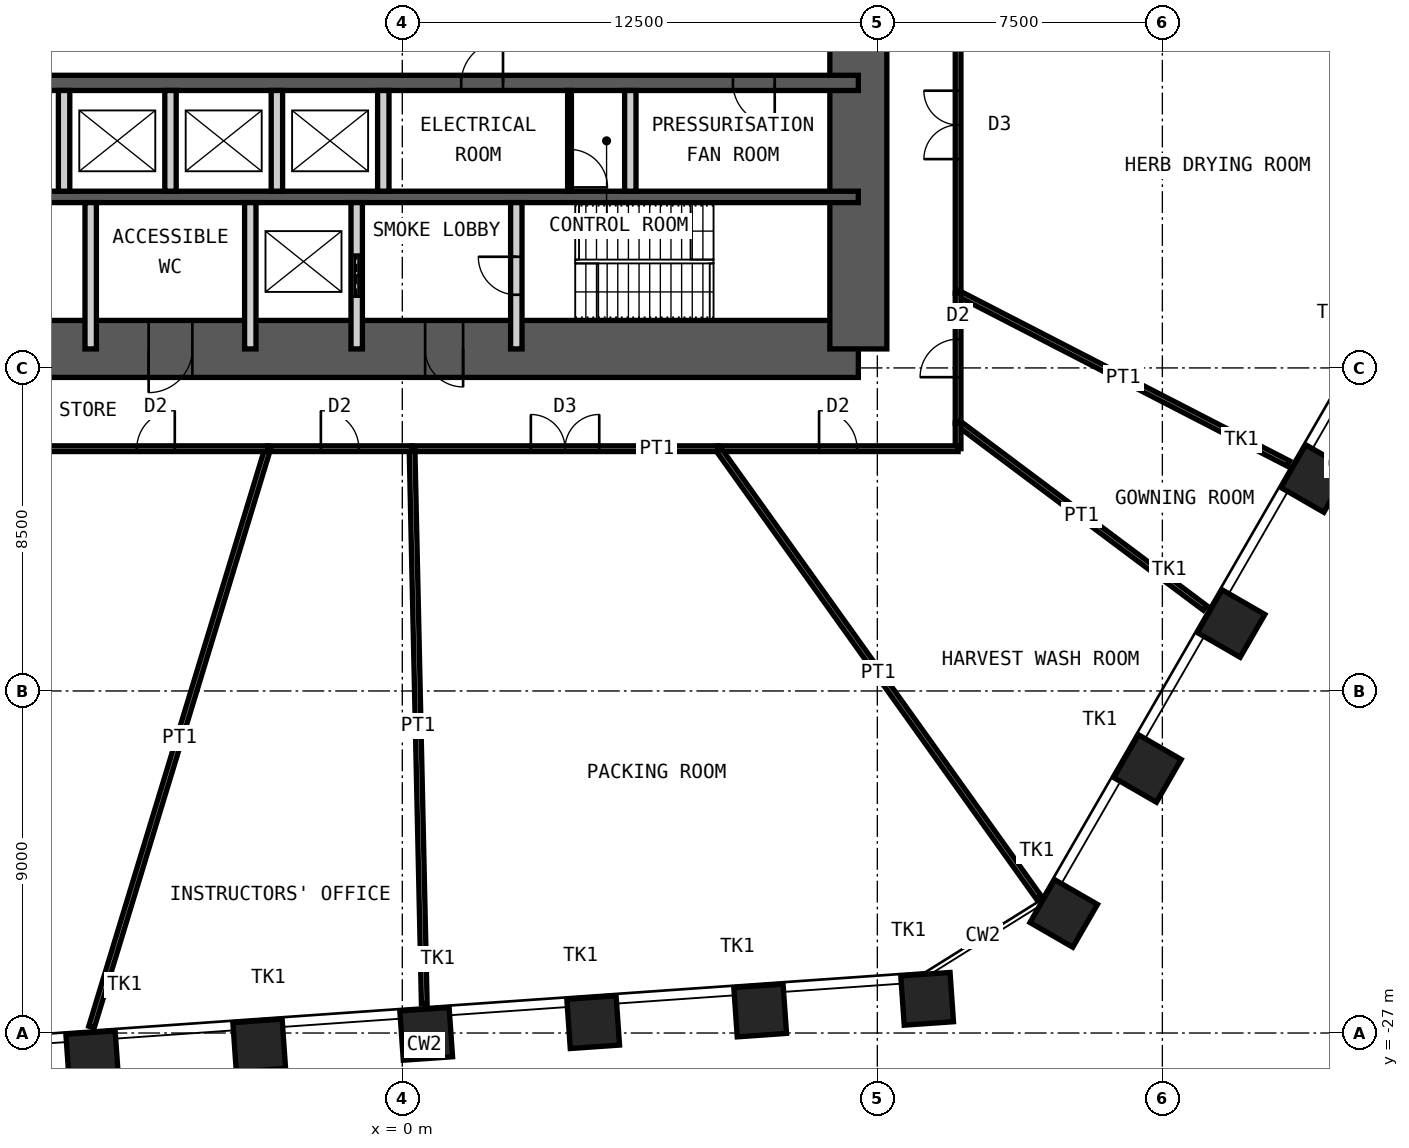
"""IFC4 building model, lengths in metres.
Left out: names, types, materials, properties, quantities, classifications, styles, units other than length and angle.
Written with IfcOpenShell. Run it as: python <this file> out.ifc"""

import sys

from ifc_helpers import new_model, si_unit, direction, frame, frame_2d, origin, origin_2d, place, context, subcontext, project, spatial, rectangle, hollow_rectangle, extrude, element, fill, save


model = new_model("IFC4")
c1 = context("Model", 3, precision=1e-05, world=origin(), true_north=direction((0.0, 1.0)))
c2 = subcontext(c1, "Body", "Model", "MODEL_VIEW")
j1 = project(units=[si_unit("LENGTHUNIT", "METRE"), si_unit("PLANEANGLEUNIT", "RADIAN")], contexts=[c1])
p1 = place(None, origin())
s1 = spatial("IfcSite", under=j1, at=p1, CompositionType="ELEMENT")
p2 = place(p1, origin())
s2 = spatial("IfcBuilding", under=s1, at=p2, CompositionType="ELEMENT")
p3 = place(p2, frame((0.0, 0.0, 92.0)))
s3 = spatial("IfcBuildingStorey", under=s2, at=p3, CompositionType="ELEMENT", Elevation=92.0)
for number, where, z_axis, x_axis in (
    (1, (24.011, -12.411, 0.0), (0.0, 0.0, 1.0), (0.5, 0.866, 0.0)),
    (2, (21.809, -16.225, 0.0), (0.0, 0.0, 1.0), (0.5, 0.866, 0.0)),
    (3, (19.607, -20.04, 0.0), (0.0, 0.0, 1.0), (0.5, 0.866, 0.0)),
    (4, (17.405, -23.854, 0.0), (0.0, 0.0, 1.0), (0.5, 0.866, 0.0)),
    (5, (13.811, -26.1, 0.0), (0.0, 0.0, 1.0), (0.998, 0.07, 0.0)),
    (6, (9.417, -26.407, 0.0), (0.0, 0.0, 1.0), (0.998, 0.07, 0.0)),
    (7, (5.023, -26.715, 0.0), (0.0, 0.0, 1.0), (0.998, 0.07, 0.0)),
    (8, (0.629, -27.022, 0.0), (0.0, 0.0, 1.0), (0.998, 0.07, 0.0)),
    (9, (-3.765, -27.329, 0.0), (0.0, 0.0, 1.0), (0.998, 0.07, 0.0)),
    (10, (-8.159, -27.636, 0.0), (0.0, 0.0, 1.0), (0.998, 0.07, 0.0)),
):
    element("IfcColumn", number, at=place(p3, frame(where, z_axis=z_axis, x_axis=x_axis)), inside=s3, PredefinedType="COLUMN", context=c2, shape_type="SweptSolid", body=[
        extrude(hollow_rectangle(XDim=1.3, YDim=1.3, WallThickness=0.1, at=origin_2d()), origin(), (0.0, 0.0, 1.0), 5.0),
    ])
p4 = place(p3, frame((-12.0, -9.0, 0.0), z_axis=(0.0, 0.0, 1.0), x_axis=(1.0, 0.0, 0.0)))
e11 = element("IfcWall", 11, at=p4, inside=s3, PredefinedType="SHEAR", context=c2, shape_type="SweptSolid", body=[
    extrude(rectangle(XDim=24.0, YDim=1.5, at=frame_2d((12.0, 0.0))), origin(), (0.0, 0.0, 1.0), 5.0),
])
p5 = place(p4, frame((1.35, 0.0, 0.0)))
e12 = element("IfcOpeningElement", 12, at=p5, cuts=e11, PredefinedType="OPENING", context=c2, shape_type="SweptSolid", body=[
    extrude(rectangle(XDim=1.0, YDim=2.1, at=frame_2d((0.5, 1.05))), frame((0.0, 0.76, 0.0), z_axis=(0.0, -1.0, 0.0), x_axis=(1.0, 0.0, 0.0)), (0.0, 0.0, 1.0), 1.52),
])
p6 = place(p4, frame((5.325, 0.0, 0.0)))
e13 = element("IfcOpeningElement", 13, at=p6, cuts=e11, PredefinedType="OPENING", context=c2, shape_type="SweptSolid", body=[
    extrude(rectangle(XDim=1.15, YDim=2.1, at=frame_2d((0.575, 1.05))), frame((0.0, 0.76, 0.0), z_axis=(0.0, -1.0, 0.0), x_axis=(1.0, 0.0, 0.0)), (0.0, 0.0, 1.0), 1.52),
])
p7 = place(p4, frame((12.6, 0.0, 0.0)))
e14 = element("IfcOpeningElement", 14, at=p7, cuts=e11, PredefinedType="OPENING", context=c2, shape_type="SweptSolid", body=[
    extrude(rectangle(XDim=1.0, YDim=2.1, at=frame_2d((0.5, 1.05))), frame((0.0, 0.76, 0.0), z_axis=(0.0, -1.0, 0.0), x_axis=(1.0, 0.0, 0.0)), (0.0, 0.0, 1.0), 1.52),
])
p8 = place(p3, frame((12.0, -9.0, 0.0), z_axis=(0.0, 0.0, 1.0), x_axis=(0.0, 1.0, 0.0)))
e15 = element("IfcWall", 15, at=p8, inside=s3, PredefinedType="SHEAR", context=c2, shape_type="SweptSolid", body=[
    extrude(rectangle(XDim=18.0, YDim=1.5, at=frame_2d((9.0, 0.0))), origin(), (0.0, 0.0, 1.0), 5.0),
])
p9 = place(p8, frame((8.1, 0.0, 0.0)))
e16 = element("IfcOpeningElement", 16, at=p9, cuts=e15, PredefinedType="OPENING", context=c2, shape_type="SweptSolid", body=[
    extrude(rectangle(XDim=1.8, YDim=2.1, at=frame_2d((0.9, 1.05))), frame((0.0, 0.76, 0.0), z_axis=(0.0, -1.0, 0.0), x_axis=(1.0, 0.0, 0.0)), (0.0, 0.0, 1.0), 1.52),
])
p10 = place(p3, frame((-12.0, -2.0, 0.0), z_axis=(0.0, 0.0, 1.0), x_axis=(1.0, 0.0, 0.0)))
e17 = element("IfcWall", 17, at=p10, inside=s3, PredefinedType="SHEAR", context=c2, shape_type="SweptSolid", body=[
    extrude(rectangle(XDim=24.0, YDim=0.4, at=frame_2d((12.0, 0.0))), origin(), (0.0, 0.0, 1.0), 5.0),
])
p11 = place(p10, frame((1.1, 0.0, 0.0)))
e18 = element("IfcOpeningElement", 18, at=p11, cuts=e17, PredefinedType="OPENING", context=c2, shape_type="SweptSolid", body=[
    extrude(rectangle(XDim=1.1, YDim=2.1, at=frame_2d((0.55, 1.05))), frame((0.0, 0.21, 0.0), z_axis=(0.0, -1.0, 0.0), x_axis=(1.0, 0.0, 0.0)), (0.0, 0.0, 1.0), 0.42),
])
p12 = place(p10, frame((13.55, 0.0, 0.0)))
e19 = element("IfcOpeningElement", 19, at=p12, cuts=e17, PredefinedType="OPENING", context=c2, shape_type="SweptSolid", body=[
    extrude(rectangle(XDim=1.1, YDim=2.1, at=frame_2d((0.55, 1.05))), frame((0.0, 0.21, 0.0), z_axis=(0.0, -1.0, 0.0), x_axis=(1.0, 0.0, 0.0)), (0.0, 0.0, 1.0), 0.42),
])
p13 = place(p10, frame((20.7, 0.0, 0.0)))
e20 = element("IfcOpeningElement", 20, at=p13, cuts=e17, PredefinedType="OPENING", context=c2, shape_type="SweptSolid", body=[
    extrude(rectangle(XDim=1.1, YDim=2.1, at=frame_2d((0.55, 1.05))), frame((0.0, 0.21, 0.0), z_axis=(0.0, -1.0, 0.0), x_axis=(1.0, 0.0, 0.0)), (0.0, 0.0, 1.0), 0.42),
])
p14 = place(p3, frame((-12.0, -5.0, 0.0), z_axis=(0.0, 0.0, 1.0), x_axis=(1.0, 0.0, 0.0)))
e21 = element("IfcWall", 21, at=p14, inside=s3, PredefinedType="SHEAR", context=c2, shape_type="SweptSolid", body=[
    extrude(rectangle(XDim=24.0, YDim=0.3, at=frame_2d((12.0, 0.0))), origin(), (0.0, 0.0, 1.0), 5.0),
])
for number, where, z_axis, x_axis in (
    (22, (-8.9, -4.85, 0.0), (0.0, 0.0, 1.0), (0.0, 1.0, 0.0)),
    (23, (-6.1, -4.85, 0.0), (0.0, 0.0, 1.0), (0.0, 1.0, 0.0)),
    (24, (-3.3, -4.85, 0.0), (0.0, 0.0, 1.0), (0.0, 1.0, 0.0)),
    (25, (-0.5, -4.85, 0.0), (0.0, 0.0, 1.0), (0.0, 1.0, 0.0)),
    (26, (6.0, -4.85, 0.0), (0.0, 0.0, 1.0), (0.0, 1.0, 0.0)),
):
    element("IfcWall", number, at=place(p3, frame(where, z_axis=z_axis, x_axis=x_axis)), inside=s3, PredefinedType="PARTITIONING", context=c2, shape_type="SweptSolid", body=[
        extrude(rectangle(XDim=2.65, YDim=0.3, at=frame_2d((1.325, 0.0))), origin(), (0.0, 0.0, 1.0), 4.78),
    ])
for number, where, z_axis, x_axis in (
    (27, (-8.2, -9.0, 0.0), (0.0, 0.0, 1.0), (0.0, 1.0, 0.0)),
    (28, (-4.0, -9.0, 0.0), (0.0, 0.0, 1.0), (0.0, 1.0, 0.0)),
):
    element("IfcWall", number, at=place(p3, frame(where, z_axis=z_axis, x_axis=x_axis)), inside=s3, PredefinedType="PARTITIONING", context=c2, shape_type="SweptSolid", body=[
        extrude(rectangle(XDim=3.85, YDim=0.3, at=frame_2d((1.925, 0.0))), origin(), (0.0, 0.0, 1.0), 4.78),
    ])
p15 = place(p3, frame((-1.2, -9.0, 0.0), z_axis=(0.0, 0.0, 1.0), x_axis=(0.0, 1.0, 0.0)))
e29 = element("IfcWall", 29, at=p15, inside=s3, PredefinedType="PARTITIONING", context=c2, shape_type="SweptSolid", body=[
    extrude(rectangle(XDim=3.85, YDim=0.3, at=frame_2d((1.925, 0.0))), origin(), (0.0, 0.0, 1.0), 4.78),
])
p16 = place(p15, frame((1.375, 0.0, 0.0)))
e30 = element("IfcOpeningElement", 30, at=p16, cuts=e29, PredefinedType="OPENING", context=c2, shape_type="SweptSolid", body=[
    extrude(rectangle(XDim=1.1, YDim=2.4, at=frame_2d((0.55, 1.2))), frame((0.0, 0.16, 0.0), z_axis=(0.0, -1.0, 0.0), x_axis=(1.0, 0.0, 0.0)), (0.0, 0.0, 1.0), 0.32),
])
p17 = place(p3, frame((3.0, -9.0, 0.0), z_axis=(0.0, 0.0, 1.0), x_axis=(0.0, 1.0, 0.0)))
e31 = element("IfcWall", 31, at=p17, inside=s3, PredefinedType="PARTITIONING", context=c2, shape_type="SweptSolid", body=[
    extrude(rectangle(XDim=3.85, YDim=0.3, at=frame_2d((1.925, 0.0))), origin(), (0.0, 0.0, 1.0), 4.78),
])
p18 = place(p17, frame((1.425, 0.0, 0.0)))
e32 = element("IfcOpeningElement", 32, at=p18, cuts=e31, PredefinedType="OPENING", context=c2, shape_type="SweptSolid", body=[
    extrude(rectangle(XDim=1.0, YDim=2.1, at=frame_2d((0.5, 1.05))), frame((0.0, 0.16, 0.0), z_axis=(0.0, -1.0, 0.0), x_axis=(1.0, 0.0, 0.0)), (0.0, 0.0, 1.0), 0.32),
])
p19 = place(p3, frame((4.4, -4.85, 0.0), z_axis=(0.0, 0.0, 1.0), x_axis=(0.0, 1.0, 0.0)))
e33 = element("IfcWall", 33, at=p19, inside=s3, PredefinedType="PARTITIONING", context=c2, shape_type="SweptSolid", body=[
    extrude(rectangle(XDim=2.65, YDim=0.1, at=frame_2d((1.325, 0.0))), origin(), (0.0, 0.0, 1.0), 4.78),
])
p20 = place(p19, frame((0.1, 0.0, 0.0)))
e34 = element("IfcOpeningElement", 34, at=p20, cuts=e33, PredefinedType="OPENING", context=c2, shape_type="SweptSolid", body=[
    extrude(rectangle(XDim=1.0, YDim=2.4, at=frame_2d((0.5, 1.2))), frame((0.0, 0.06, 0.0), z_axis=(0.0, -1.0, 0.0), x_axis=(1.0, 0.0, 0.0)), (0.0, 0.0, 1.0), 0.12),
])
p21 = place(p3, frame((14.625, 1.325, 0.0), z_axis=(0.0, 0.0, 1.0), x_axis=(0.0, -1.0, 0.0)))
e35 = element("IfcWall", 35, at=p21, inside=s3, PredefinedType="PARTITIONING", context=c2, shape_type="SweptSolid", body=[
    extrude(rectangle(XDim=8.862, YDim=0.15, at=frame_2d((4.431, 0.0))), origin(), (0.0, 0.0, 1.0), 4.72),
])
p22 = place(p21, frame((3.531, 0.0, 0.0)))
e36 = element("IfcOpeningElement", 36, at=p22, cuts=e35, PredefinedType="OPENING", context=c2, shape_type="SweptSolid", body=[
    extrude(rectangle(XDim=1.8, YDim=2.4, at=frame_2d((0.9, 1.2))), frame((0.0, 0.085, 0.0), z_axis=(0.0, -1.0, 0.0), x_axis=(1.0, 0.0, 0.0)), (0.0, 0.0, 1.0), 0.17),
])
p23 = place(p3, frame((23.316, -12.015, 0.0), z_axis=(0.0, 0.0, 1.0), x_axis=(-0.888917561609, 0.458067209767, 0.0)))
e37 = element("IfcWall", 37, at=p23, inside=s3, PredefinedType="PARTITIONING", context=c2, shape_type="SweptSolid", body=[
    extrude(rectangle(XDim=9.778, YDim=0.15, at=frame_2d((4.889, 0.0))), origin(), (0.0, 0.0, 1.0), 3.52),
])
p24 = place(p3, frame((14.625, -7.536, 0.0), z_axis=(0.0, 0.0, 1.0), x_axis=(0.0, -1.0, 0.0)))
e38 = element("IfcWall", 38, at=p24, inside=s3, PredefinedType="PARTITIONING", context=c2, shape_type="SweptSolid", body=[
    extrude(rectangle(XDim=3.414, YDim=0.15, at=frame_2d((1.707, 0.0))), origin(), (0.0, 0.0, 1.0), 4.72),
])
p25 = place(p24, frame((1.207, 0.0, 0.0)))
e39 = element("IfcOpeningElement", 39, at=p25, cuts=e38, PredefinedType="OPENING", context=c2, shape_type="SweptSolid", body=[
    extrude(rectangle(XDim=1.0, YDim=2.4, at=frame_2d((0.5, 1.2))), frame((0.0, 0.085, 0.0), z_axis=(0.0, -1.0, 0.0), x_axis=(1.0, 0.0, 0.0)), (0.0, 0.0, 1.0), 0.17),
])
p26 = place(p3, frame((21.123, -15.815, 0.0), z_axis=(0.0, 0.0, 1.0), x_axis=(-0.800490565123, 0.599345355492, 0.0)))
e40 = element("IfcWall", 40, at=p26, inside=s3, PredefinedType="PARTITIONING", context=c2, shape_type="SweptSolid", body=[
    extrude(rectangle(XDim=8.118, YDim=0.15, at=frame_2d((4.059, 0.0))), origin(), (0.0, 0.0, 1.0), 3.82),
])
p27 = place(p3, frame((14.625, -10.95, 0.0), z_axis=(0.0, 0.0, 1.0), x_axis=(0.0, -1.0, 0.0)))
e41 = element("IfcWall", 41, at=p27, inside=s3, PredefinedType="PARTITIONING", context=c2, shape_type="SweptSolid", body=[
    extrude(rectangle(XDim=0.675, YDim=0.15, at=frame_2d((0.337, 0.0))), origin(), (0.0, 0.0, 1.0), 4.72),
])
p28 = place(p3, frame((14.625, -11.625, 0.0), z_axis=(0.0, 0.0, 1.0), x_axis=(-1.0, 0.0, 0.0)))
e42 = element("IfcWall", 42, at=p28, inside=s3, PredefinedType="PARTITIONING", context=c2, shape_type="SweptSolid", body=[
    extrude(rectangle(XDim=6.317, YDim=0.15, at=frame_2d((3.158, 0.0))), origin(), (0.0, 0.0, 1.0), 4.72),
])
p29 = place(p28, frame((2.658, 0.0, 0.0)))
e43 = element("IfcOpeningElement", 43, at=p29, cuts=e42, PredefinedType="OPENING", context=c2, shape_type="SweptSolid", body=[
    extrude(rectangle(XDim=1.0, YDim=2.4, at=frame_2d((0.5, 1.2))), frame((0.0, 0.085, 0.0), z_axis=(0.0, -1.0, 0.0), x_axis=(1.0, 0.0, 0.0)), (0.0, 0.0, 1.0), 0.17),
])
p30 = place(p3, frame((16.74, -23.423, 0.0), z_axis=(0.0, 0.0, 1.0), x_axis=(-0.581451576506, 0.813581012671, 0.0)))
e44 = element("IfcWall", 44, at=p30, inside=s3, PredefinedType="PARTITIONING", context=c2, shape_type="SweptSolid", body=[
    extrude(rectangle(XDim=14.501, YDim=0.15, at=frame_2d((7.251, 0.0))), origin(), (0.0, 0.0, 1.0), 3.82),
])
p31 = place(p3, frame((8.308, -11.625, 0.0), z_axis=(0.0, 0.0, 1.0), x_axis=(-1.0, 0.0, 0.0)))
e45 = element("IfcWall", 45, at=p31, inside=s3, PredefinedType="PARTITIONING", context=c2, shape_type="SweptSolid", body=[
    extrude(rectangle(XDim=8.052, YDim=0.15, at=frame_2d((4.026, 0.0))), origin(), (0.0, 0.0, 1.0), 4.72),
])
p32 = place(p31, frame((3.126, 0.0, 0.0)))
e46 = element("IfcOpeningElement", 46, at=p32, cuts=e45, PredefinedType="OPENING", context=c2, shape_type="SweptSolid", body=[
    extrude(rectangle(XDim=1.8, YDim=2.4, at=frame_2d((0.9, 1.2))), frame((0.0, 0.085, 0.0), z_axis=(0.0, -1.0, 0.0), x_axis=(1.0, 0.0, 0.0)), (0.0, 0.0, 1.0), 0.17),
])
p33 = place(p3, frame((0.578, -26.224, 0.0), z_axis=(0.0, 0.0, 1.0), x_axis=(-0.02203625582, 0.999757172232, 0.0)))
e47 = element("IfcWall", 47, at=p33, inside=s3, PredefinedType="PARTITIONING", context=c2, shape_type="SweptSolid", body=[
    extrude(rectangle(XDim=14.602, YDim=0.15, at=frame_2d((7.301, 0.0))), origin(), (0.0, 0.0, 1.0), 3.82),
])
p34 = place(p3, frame((0.256, -11.625, 0.0), z_axis=(0.0, 0.0, 1.0), x_axis=(-1.0, 0.0, 0.0)))
e48 = element("IfcWall", 48, at=p34, inside=s3, PredefinedType="PARTITIONING", context=c2, shape_type="SweptSolid", body=[
    extrude(rectangle(XDim=3.798, YDim=0.15, at=frame_2d((1.899, 0.0))), origin(), (0.0, 0.0, 1.0), 4.72),
])
p35 = place(p34, frame((1.399, 0.0, 0.0)))
e49 = element("IfcOpeningElement", 49, at=p35, cuts=e48, PredefinedType="OPENING", context=c2, shape_type="SweptSolid", body=[
    extrude(rectangle(XDim=1.0, YDim=2.4, at=frame_2d((0.5, 1.2))), frame((0.0, 0.085, 0.0), z_axis=(0.0, -1.0, 0.0), x_axis=(1.0, 0.0, 0.0)), (0.0, 0.0, 1.0), 0.17),
])
p36 = place(p3, frame((-8.179, -26.843, 0.0), z_axis=(0.0, 0.0, 1.0), x_axis=(0.291466333136, 0.956581087336, 0.0)))
e50 = element("IfcWall", 50, at=p36, inside=s3, PredefinedType="PARTITIONING", context=c2, shape_type="SweptSolid", body=[
    extrude(rectangle(XDim=15.908, YDim=0.15, at=frame_2d((7.954, 0.0))), origin(), (0.0, 0.0, 1.0), 3.82),
])
p37 = place(p3, frame((-3.542, -11.625, 0.0), z_axis=(0.0, 0.0, 1.0), x_axis=(-1.0, 0.0, 0.0)))
e51 = element("IfcWall", 51, at=p37, inside=s3, PredefinedType="PARTITIONING", context=c2, shape_type="SweptSolid", body=[
    extrude(rectangle(XDim=5.89, YDim=0.15, at=frame_2d((2.945, 0.0))), origin(), (0.0, 0.0, 1.0), 4.72),
])
p38 = place(p37, frame((2.445, 0.0, 0.0)))
e52 = element("IfcOpeningElement", 52, at=p38, cuts=e51, PredefinedType="OPENING", context=c2, shape_type="SweptSolid", body=[
    extrude(rectangle(XDim=1.0, YDim=2.4, at=frame_2d((0.5, 1.2))), frame((0.0, 0.085, 0.0), z_axis=(0.0, -1.0, 0.0), x_axis=(1.0, 0.0, 0.0)), (0.0, 0.0, 1.0), 0.17),
])
p39 = place(p6, origin())
e53 = element("IfcDoor", 53, at=p39, inside=s3, OperationType="SINGLE_SWING_LEFT", PredefinedType="DOOR", context=c2, shape_type="SweptSolid", body=[
    extrude(rectangle(XDim=1.15, YDim=2.1, at=frame_2d((0.575, 1.05))), frame((0.0, 0.025, 0.0), z_axis=(0.0, -1.0, 0.0), x_axis=(1.0, 0.0, 0.0)), (0.0, 0.0, 1.0), 0.05),
])
fill(e13, e53)
p40 = place(p7, origin())
e54 = element("IfcDoor", 54, at=p40, inside=s3, OperationType="SINGLE_SWING_RIGHT", PredefinedType="DOOR", context=c2, shape_type="SweptSolid", body=[
    extrude(rectangle(XDim=1.0, YDim=2.1, at=frame_2d((0.5, 1.05))), frame((0.0, 0.025, 0.0), z_axis=(0.0, -1.0, 0.0), x_axis=(1.0, 0.0, 0.0)), (0.0, 0.0, 1.0), 0.05),
])
fill(e14, e54)
p41 = place(p18, origin())
e55 = element("IfcDoor", 55, at=p41, inside=s3, OperationType="SINGLE_SWING_LEFT", PredefinedType="DOOR", context=c2, shape_type="SweptSolid", body=[
    extrude(rectangle(XDim=1.0, YDim=2.1, at=frame_2d((0.5, 1.05))), frame((0.0, 0.025, 0.0), z_axis=(0.0, -1.0, 0.0), x_axis=(1.0, 0.0, 0.0)), (0.0, 0.0, 1.0), 0.05),
])
fill(e32, e55)
p42 = place(p12, origin())
e56 = element("IfcDoor", 56, at=p42, inside=s3, OperationType="SINGLE_SWING_LEFT", PredefinedType="DOOR", context=c2, shape_type="SweptSolid", body=[
    extrude(rectangle(XDim=1.1, YDim=2.1, at=frame_2d((0.55, 1.05))), frame((0.0, 0.025, 0.0), z_axis=(0.0, -1.0, 0.0), x_axis=(1.0, 0.0, 0.0)), (0.0, 0.0, 1.0), 0.05),
])
fill(e19, e56)
p43 = place(p13, origin())
e57 = element("IfcDoor", 57, at=p43, inside=s3, OperationType="SINGLE_SWING_RIGHT", PredefinedType="DOOR", context=c2, shape_type="SweptSolid", body=[
    extrude(rectangle(XDim=1.1, YDim=2.1, at=frame_2d((0.55, 1.05))), frame((0.0, 0.025, 0.0), z_axis=(0.0, -1.0, 0.0), x_axis=(1.0, 0.0, 0.0)), (0.0, 0.0, 1.0), 0.05),
])
fill(e20, e57)
p44 = place(p16, origin())
e58 = element("IfcDoor", 58, at=p44, inside=s3, OperationType="DOUBLE_DOOR_SLIDING", PredefinedType="DOOR", context=c2, shape_type="SweptSolid", body=[
    extrude(rectangle(XDim=1.1, YDim=2.4, at=frame_2d((0.55, 1.2))), frame((0.0, 0.025, 0.0), z_axis=(0.0, -1.0, 0.0), x_axis=(1.0, 0.0, 0.0)), (0.0, 0.0, 1.0), 0.05),
])
fill(e30, e58)
p45 = place(p20, origin())
e59 = element("IfcDoor", 59, at=p45, inside=s3, OperationType="SINGLE_SWING_LEFT", PredefinedType="DOOR", context=c2, shape_type="SweptSolid", body=[
    extrude(rectangle(XDim=1.0, YDim=2.4, at=frame_2d((0.5, 1.2))), frame((0.0, 0.025, 0.0), z_axis=(0.0, -1.0, 0.0), x_axis=(1.0, 0.0, 0.0)), (0.0, 0.0, 1.0), 0.05),
])
fill(e34, e59)
p46 = place(p22, origin())
e60 = element("IfcDoor", 60, at=p46, inside=s3, OperationType="DOUBLE_DOOR_DOUBLE_SWING", PredefinedType="DOOR", context=c2, shape_type="SweptSolid", body=[
    extrude(rectangle(XDim=1.8, YDim=2.4, at=frame_2d((0.9, 1.2))), frame((0.0, 0.025, 0.0), z_axis=(0.0, -1.0, 0.0), x_axis=(1.0, 0.0, 0.0)), (0.0, 0.0, 1.0), 0.05),
])
fill(e36, e60)
p47 = place(p25, origin())
e61 = element("IfcDoor", 61, at=p47, inside=s3, OperationType="SINGLE_SWING_RIGHT", PredefinedType="DOOR", context=c2, shape_type="SweptSolid", body=[
    extrude(rectangle(XDim=1.0, YDim=2.4, at=frame_2d((0.5, 1.2))), frame((0.0, 0.025, 0.0), z_axis=(0.0, -1.0, 0.0), x_axis=(1.0, 0.0, 0.0)), (0.0, 0.0, 1.0), 0.05),
])
fill(e39, e61)
p48 = place(p29, origin())
e62 = element("IfcDoor", 62, at=p48, inside=s3, OperationType="SINGLE_SWING_RIGHT", PredefinedType="DOOR", context=c2, shape_type="SweptSolid", body=[
    extrude(rectangle(XDim=1.0, YDim=2.4, at=frame_2d((0.5, 1.2))), frame((0.0, 0.025, 0.0), z_axis=(0.0, -1.0, 0.0), x_axis=(1.0, 0.0, 0.0)), (0.0, 0.0, 1.0), 0.05),
])
fill(e43, e62)
p49 = place(p32, origin())
e63 = element("IfcDoor", 63, at=p49, inside=s3, OperationType="DOUBLE_DOOR_DOUBLE_SWING", PredefinedType="DOOR", context=c2, shape_type="SweptSolid", body=[
    extrude(rectangle(XDim=1.8, YDim=2.4, at=frame_2d((0.9, 1.2))), frame((0.0, 0.025, 0.0), z_axis=(0.0, -1.0, 0.0), x_axis=(1.0, 0.0, 0.0)), (0.0, 0.0, 1.0), 0.05),
])
fill(e46, e63)
p50 = place(p35, origin())
e64 = element("IfcDoor", 64, at=p50, inside=s3, OperationType="SINGLE_SWING_RIGHT", PredefinedType="DOOR", context=c2, shape_type="SweptSolid", body=[
    extrude(rectangle(XDim=1.0, YDim=2.4, at=frame_2d((0.5, 1.2))), frame((0.0, 0.025, 0.0), z_axis=(0.0, -1.0, 0.0), x_axis=(1.0, 0.0, 0.0)), (0.0, 0.0, 1.0), 0.05),
])
fill(e49, e64)
p51 = place(p38, origin())
e65 = element("IfcDoor", 65, at=p51, inside=s3, OperationType="SINGLE_SWING_LEFT", PredefinedType="DOOR", context=c2, shape_type="SweptSolid", body=[
    extrude(rectangle(XDim=1.0, YDim=2.4, at=frame_2d((0.5, 1.2))), frame((0.0, 0.025, 0.0), z_axis=(0.0, -1.0, 0.0), x_axis=(1.0, 0.0, 0.0)), (0.0, 0.0, 1.0), 0.05),
])
fill(e52, e65)
save(model, sys.argv[1])
